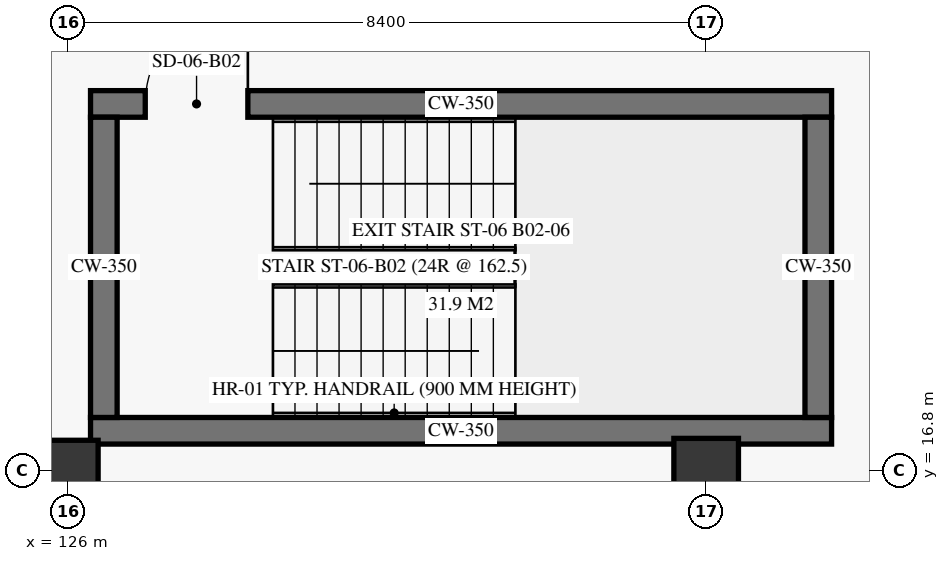
"""IFC4 building model, lengths in metres.
Left out: names, types, materials, properties, quantities, classifications, styles, units other than length and angle.
Written with IfcOpenShell. Run it as: python <this file> out.ifc"""

import sys

from ifc_helpers import new_model, si_unit, direction, frame, frame_2d, origin, origin_2d, place, context, subcontext, project, spatial, rectangle, extrude, element, fill, save


model = new_model("IFC4")
c1 = context("Model", 3, precision=1e-05, world=origin(), true_north=direction((0.0, 1.0)))
c2 = subcontext(c1, "Body", "Model", "MODEL_VIEW")
j1 = project(units=[si_unit("LENGTHUNIT", "METRE"), si_unit("PLANEANGLEUNIT", "RADIAN")], contexts=[c1])
p1 = place(None, origin())
s1 = spatial("IfcSite", under=j1, at=p1, CompositionType="ELEMENT")
p2 = place(p1, origin())
s2 = spatial("IfcBuilding", under=s1, at=p2, CompositionType="ELEMENT")
p3 = place(p2, frame((0.0, 0.0, -8.1)))
s3 = spatial("IfcBuildingStorey", under=s2, at=p3, CompositionType="ELEMENT", Elevation=-8.1)
p4 = place(p3, frame((126.0, 16.8, 0.0), z_axis=(0.0, 0.0, 1.0), x_axis=(1.0, 0.0, 0.0)))
e1 = element("IfcColumn", 1, at=p4, inside=s3, PredefinedType="COLUMN", context=c2, shape_type="SweptSolid", body=[
    extrude(rectangle(XDim=0.8, YDim=0.8, at=origin_2d()), origin(), (0.0, 0.0, 1.0), 3.6),
])
p5 = place(p3, frame((134.4, 16.8, 0.0), z_axis=(0.0, 0.0, 1.0), x_axis=(1.0, 0.0, 0.0)))
e2 = element("IfcColumn", 2, at=p5, inside=s3, PredefinedType="COLUMN", context=c2, shape_type="SweptSolid", body=[
    extrude(rectangle(XDim=0.85, YDim=0.85, at=origin_2d()), origin(), (0.0, 0.0, 1.0), 3.6),
])
p6 = place(p3, frame((126.3, 17.325, 0.0), z_axis=(0.0, 0.0, 1.0), x_axis=(1.0, 0.0, 0.0)))
e3 = element("IfcWall", 3, at=p6, inside=s3, PredefinedType="SHEAR", context=c2, shape_type="SweptSolid", body=[
    extrude(rectangle(XDim=9.75, YDim=0.35, at=frame_2d((4.875, 0.0))), origin(), (0.0, 0.0, 1.0), 3.6),
])
p7 = place(p3, frame((126.3, 21.625, 0.0), z_axis=(0.0, 0.0, 1.0), x_axis=(1.0, 0.0, 0.0)))
e4 = element("IfcWall", 4, at=p7, inside=s3, PredefinedType="SHEAR", context=c2, shape_type="SweptSolid", body=[
    extrude(rectangle(XDim=9.75, YDim=0.35, at=frame_2d((4.875, 0.0))), origin(), (0.0, 0.0, 1.0), 3.6),
])
p8 = place(p7, frame((0.72, 0.0, 0.0)))
e5 = element("IfcOpeningElement", 5, at=p8, cuts=e4, PredefinedType="OPENING", context=c2, shape_type="SweptSolid", body=[
    extrude(rectangle(XDim=1.35, YDim=2.25, at=frame_2d((0.675, 1.125))), frame((0.0, 0.185, 0.0), z_axis=(0.0, -1.0, 0.0), x_axis=(1.0, 0.0, 0.0)), (0.0, 0.0, 1.0), 0.37),
])
for number, where, z_axis, x_axis in (
    (6, (126.475, 17.5, 0.0), (0.0, 0.0, 1.0), (0.0, 1.0, 0.0)),
    (7, (135.875, 17.5, 0.0), (0.0, 0.0, 1.0), (0.0, 1.0, 0.0)),
):
    element("IfcWall", number, at=place(p3, frame(where, z_axis=z_axis, x_axis=x_axis)), inside=s3, PredefinedType="SHEAR", context=c2, shape_type="SweptSolid", body=[
        extrude(rectangle(XDim=3.95, YDim=0.35, at=frame_2d((1.975, 0.0))), origin(), (0.0, 0.0, 1.0), 3.6),
    ])
p9 = place(p8, origin())
e8 = element("IfcDoor", 8, at=p9, inside=s3, OperationType="SINGLE_SWING_RIGHT", PredefinedType="DOOR", context=c2, shape_type="SweptSolid", body=[
    extrude(rectangle(XDim=1.35, YDim=2.25, at=frame_2d((0.675, 1.125))), frame((0.0, 0.025, 0.0), z_axis=(0.0, -1.0, 0.0), x_axis=(1.0, 0.0, 0.0)), (0.0, 0.0, 1.0), 0.05),
])
fill(e5, e8)
save(model, sys.argv[1])
